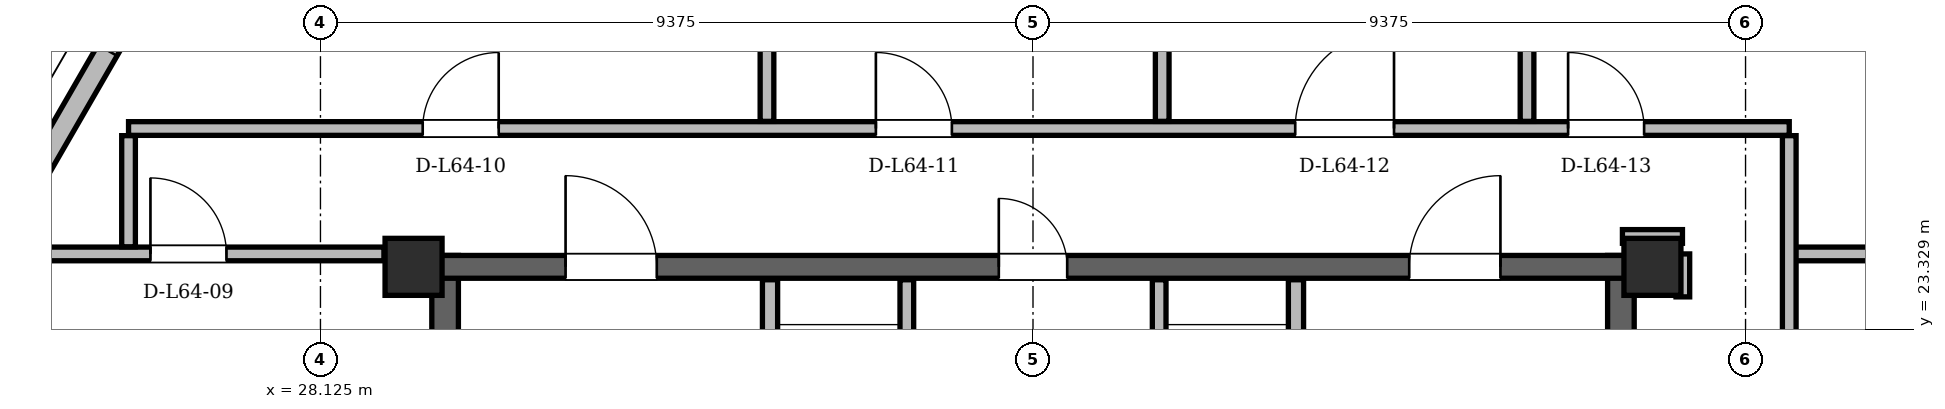
"""IFC4 building model, lengths in metres.
Left out: names, types, materials, properties, quantities, classifications, styles, units other than length and angle.
Written with IfcOpenShell. Run it as: python <this file> out.ifc"""

import sys

from ifc_helpers import new_model, si_unit, direction, frame, frame_2d, origin, origin_2d, place, context, subcontext, project, spatial, rectangle, hollow_rectangle, extrude, element, fill, save


model = new_model("IFC4")
c1 = context("Model", 3, precision=1e-05, world=origin(), true_north=direction((0.0, 1.0)))
c2 = subcontext(c1, "Body", "Model", "MODEL_VIEW")
j1 = project(units=[si_unit("LENGTHUNIT", "METRE"), si_unit("PLANEANGLEUNIT", "RADIAN")], contexts=[c1])
p1 = place(None, origin())
s1 = spatial("IfcSite", under=j1, at=p1, CompositionType="ELEMENT")
p2 = place(p1, origin())
s2 = spatial("IfcBuilding", under=s1, at=p2, CompositionType="ELEMENT")
p3 = place(p2, frame((0.0, 0.0, 241.5)))
s3 = spatial("IfcBuildingStorey", under=s2, at=p3, CompositionType="ELEMENT", Elevation=241.5)
for number, where, z_axis, x_axis in (
    (1, (45.65, 24.15, 0.0), (0.0, 0.0, 1.0), (1.0, 0.0, 0.0)),
    (2, (29.35, 24.15, 0.0), (0.0, 0.0, 1.0), (1.0, 0.0, 0.0)),
):
    element("IfcColumn", number, at=place(p3, frame(where, z_axis=z_axis, x_axis=x_axis)), inside=s3, PredefinedType="COLUMN", context=c2, shape_type="SweptSolid", body=[
        extrude(hollow_rectangle(XDim=0.75, YDim=0.75, WallThickness=0.06, at=origin_2d()), origin(), (0.0, 0.0, 1.0), 3.6),
    ])
for number, where, z_axis, x_axis in (
    (3, (29.765, 11.0, 0.0), (0.0, 0.0, 1.0), (0.0, 1.0, 0.0)),
    (4, (45.235, 11.0, 0.0), (0.0, 0.0, 1.0), (0.0, 1.0, 0.0)),
):
    element("IfcWall", number, at=place(p3, frame(where, z_axis=z_axis, x_axis=x_axis)), inside=s3, PredefinedType="SHEAR", context=c2, shape_type="SweptSolid", body=[
        extrude(rectangle(XDim=13.3, YDim=0.35, at=frame_2d((6.65, 0.0))), origin(), (0.0, 0.0, 1.0), 3.34),
    ])
p4 = place(p3, frame((29.65, 24.15, 0.0), z_axis=(0.0, 0.0, 1.0), x_axis=(1.0, 0.0, 0.0)))
e5 = element("IfcWall", 5, at=p4, inside=s3, PredefinedType="SHEAR", context=c2, shape_type="SweptSolid", body=[
    extrude(rectangle(XDim=15.7, YDim=0.3, at=frame_2d((7.85, 0.0))), origin(), (0.0, 0.0, 1.0), 3.34),
])
p5 = place(p4, frame((1.7, 0.0, 0.0)))
e6 = element("IfcOpeningElement", 6, at=p5, cuts=e5, PredefinedType="OPENING", context=c2, shape_type="SweptSolid", body=[
    extrude(rectangle(XDim=1.2, YDim=2.2, at=frame_2d((0.6, 1.1))), frame((0.0, 0.15, 0.0), z_axis=(0.0, -1.0, 0.0), x_axis=(1.0, 0.0, 0.0)), (0.0, 0.0, 1.0), 0.3),
])
p6 = place(p4, frame((12.8, 0.0, 0.0)))
e7 = element("IfcOpeningElement", 7, at=p6, cuts=e5, PredefinedType="OPENING", context=c2, shape_type="SweptSolid", body=[
    extrude(rectangle(XDim=1.2, YDim=2.2, at=frame_2d((0.6, 1.1))), frame((0.0, 0.15, 0.0), z_axis=(0.0, -1.0, 0.0), x_axis=(1.0, 0.0, 0.0)), (0.0, 0.0, 1.0), 0.3),
])
p7 = place(p4, frame((7.4, 0.0, 0.0)))
e8 = element("IfcOpeningElement", 8, at=p7, cuts=e5, PredefinedType="OPENING", context=c2, shape_type="SweptSolid", body=[
    extrude(rectangle(XDim=0.9, YDim=2.05, at=frame_2d((0.45, 1.025))), frame((0.0, 0.15, 0.0), z_axis=(0.0, -1.0, 0.0), x_axis=(1.0, 0.0, 0.0)), (0.0, 0.0, 1.0), 0.3),
])
p8 = place(p3, frame((58.857, 11.097, 0.0), z_axis=(0.0, 0.0, 1.0), x_axis=(-0.499999075663, 0.86602593745, 0.0)))
e9 = element("IfcWall", 9, at=p8, inside=s3, PredefinedType="SOLIDWALL", context=c2, shape_type="SweptSolid", body=[
    extrude(rectangle(XDim=36.951, YDim=0.29, at=frame_2d((18.476, 0.0))), origin(), (0.0, 0.0, 1.0), 2.637),
])
p9 = place(p8, frame((7.615, 0.0, 0.0)))
e10 = element("IfcOpeningElement", 10, at=p9, cuts=e9, PredefinedType="OPENING", context=c2, shape_type="SweptSolid", body=[
    extrude(rectangle(XDim=1.5, YDim=2.2, at=frame_2d((0.75, 1.1))), frame((0.0, 0.145, 0.0), z_axis=(0.0, -1.0, 0.0), x_axis=(1.0, 0.0, 0.0)), (0.0, 0.0, 1.0), 0.29),
])
p10 = place(p8, frame((28.662, 0.0, 0.0)))
e11 = element("IfcOpeningElement", 11, at=p10, cuts=e9, PredefinedType="OPENING", context=c2, shape_type="SweptSolid", body=[
    extrude(rectangle(XDim=1.5, YDim=2.2, at=frame_2d((0.75, 1.1))), frame((0.0, 0.145, 0.0), z_axis=(0.0, -1.0, 0.0), x_axis=(1.0, 0.0, 0.0)), (0.0, 0.0, 1.0), 0.29),
])
p11 = place(p8, frame((3.768, 0.0, 0.85)))
e12 = element("IfcOpeningElement", 12, at=p11, cuts=e9, PredefinedType="OPENING", context=c2, shape_type="SweptSolid", body=[
    extrude(rectangle(XDim=1.2, YDim=1.48, at=frame_2d((0.6, 0.74))), frame((0.0, 0.145, 0.0), z_axis=(0.0, -1.0, 0.0), x_axis=(1.0, 0.0, 0.0)), (0.0, 0.0, 1.0), 0.29),
])
p12 = place(p8, frame((1.122, 0.0, 0.85)))
e13 = element("IfcOpeningElement", 13, at=p12, cuts=e9, PredefinedType="OPENING", context=c2, shape_type="SweptSolid", body=[
    extrude(rectangle(XDim=1.6, YDim=1.677, at=frame_2d((0.8, 0.838))), frame((0.0, 0.145, 0.0), z_axis=(0.0, -1.0, 0.0), x_axis=(1.0, 0.0, 0.0)), (0.0, 0.0, 1.0), 0.29),
])
p13 = place(p8, frame((34.681, 0.0, 0.85)))
e14 = element("IfcOpeningElement", 14, at=p13, cuts=e9, PredefinedType="OPENING", context=c2, shape_type="SweptSolid", body=[
    extrude(rectangle(XDim=1.2, YDim=1.48, at=frame_2d((0.6, 0.74))), frame((0.0, 0.145, 0.0), z_axis=(0.0, -1.0, 0.0), x_axis=(1.0, 0.0, 0.0)), (0.0, 0.0, 1.0), 0.29),
])
p14 = place(p8, frame((16.81, 0.0, 0.85)))
e15 = element("IfcOpeningElement", 15, at=p14, cuts=e9, PredefinedType="OPENING", context=c2, shape_type="SweptSolid", body=[
    extrude(rectangle(XDim=2.2, YDim=1.677, at=frame_2d((1.1, 0.838))), frame((0.0, 0.145, 0.0), z_axis=(0.0, -1.0, 0.0), x_axis=(1.0, 0.0, 0.0)), (0.0, 0.0, 1.0), 0.29),
])
p15 = place(p8, frame((22.803, 0.0, 0.85)))
e16 = element("IfcOpeningElement", 16, at=p15, cuts=e9, PredefinedType="OPENING", context=c2, shape_type="SweptSolid", body=[
    extrude(rectangle(XDim=1.6, YDim=1.677, at=frame_2d((0.8, 0.838))), frame((0.0, 0.145, 0.0), z_axis=(0.0, -1.0, 0.0), x_axis=(1.0, 0.0, 0.0)), (0.0, 0.0, 1.0), 0.29),
])
p16 = place(p8, frame((9.478, 0.0, 0.85)))
e17 = element("IfcOpeningElement", 17, at=p16, cuts=e9, PredefinedType="OPENING", context=c2, shape_type="SweptSolid", body=[
    extrude(rectangle(XDim=1.2, YDim=1.48, at=frame_2d((0.6, 0.74))), frame((0.0, 0.145, 0.0), z_axis=(0.0, -1.0, 0.0), x_axis=(1.0, 0.0, 0.0)), (0.0, 0.0, 1.0), 0.29),
])
p17 = place(p3, frame((34.618, 43.098, 0.0), z_axis=(0.0, 0.0, 1.0), x_axis=(-0.499999075663, -0.86602593745, 0.0)))
e18 = element("IfcWall", 18, at=p17, inside=s3, PredefinedType="SOLIDWALL", context=c2, shape_type="SweptSolid", body=[
    extrude(rectangle(XDim=36.951, YDim=0.29, at=frame_2d((18.476, 0.0))), origin(), (0.0, 0.0, 1.0), 2.637),
])
p18 = place(p17, frame((8.244, 0.0, 0.0)))
e19 = element("IfcOpeningElement", 19, at=p18, cuts=e18, PredefinedType="OPENING", context=c2, shape_type="SweptSolid", body=[
    extrude(rectangle(XDim=1.5, YDim=2.2, at=frame_2d((0.75, 1.1))), frame((0.0, 0.145, 0.0), z_axis=(0.0, -1.0, 0.0), x_axis=(1.0, 0.0, 0.0)), (0.0, 0.0, 1.0), 0.29),
])
p19 = place(p17, frame((32.022, 0.0, 0.0)))
e20 = element("IfcOpeningElement", 20, at=p19, cuts=e18, PredefinedType="OPENING", context=c2, shape_type="SweptSolid", body=[
    extrude(rectangle(XDim=1.5, YDim=2.2, at=frame_2d((0.75, 1.1))), frame((0.0, 0.145, 0.0), z_axis=(0.0, -1.0, 0.0), x_axis=(1.0, 0.0, 0.0)), (0.0, 0.0, 1.0), 0.29),
])
p20 = place(p17, frame((21.911, 0.0, 0.85)))
e21 = element("IfcOpeningElement", 21, at=p20, cuts=e18, PredefinedType="OPENING", context=c2, shape_type="SweptSolid", body=[
    extrude(rectangle(XDim=2.4, YDim=1.677, at=frame_2d((1.2, 0.838))), frame((0.0, 0.145, 0.0), z_axis=(0.0, -1.0, 0.0), x_axis=(1.0, 0.0, 0.0)), (0.0, 0.0, 1.0), 0.29),
])
p21 = place(p17, frame((28.29, 0.0, 0.85)))
e22 = element("IfcOpeningElement", 22, at=p21, cuts=e18, PredefinedType="OPENING", context=c2, shape_type="SweptSolid", body=[
    extrude(rectangle(XDim=1.2, YDim=1.48, at=frame_2d((0.6, 0.74))), frame((0.0, 0.145, 0.0), z_axis=(0.0, -1.0, 0.0), x_axis=(1.0, 0.0, 0.0)), (0.0, 0.0, 1.0), 0.29),
])
p22 = place(p17, frame((34.755, 0.0, 0.85)))
e23 = element("IfcOpeningElement", 23, at=p22, cuts=e18, PredefinedType="OPENING", context=c2, shape_type="SweptSolid", body=[
    extrude(rectangle(XDim=1.2, YDim=1.48, at=frame_2d((0.6, 0.74))), frame((0.0, 0.145, 0.0), z_axis=(0.0, -1.0, 0.0), x_axis=(1.0, 0.0, 0.0)), (0.0, 0.0, 1.0), 0.29),
])
p23 = place(p17, frame((12.233, 0.0, 0.85)))
e24 = element("IfcOpeningElement", 24, at=p23, cuts=e18, PredefinedType="OPENING", context=c2, shape_type="SweptSolid", body=[
    extrude(rectangle(XDim=1.2, YDim=1.48, at=frame_2d((0.6, 0.74))), frame((0.0, 0.145, 0.0), z_axis=(0.0, -1.0, 0.0), x_axis=(1.0, 0.0, 0.0)), (0.0, 0.0, 1.0), 0.29),
])
p24 = place(p17, frame((16.59, 0.0, 0.85)))
e25 = element("IfcOpeningElement", 25, at=p24, cuts=e18, PredefinedType="OPENING", context=c2, shape_type="SweptSolid", body=[
    extrude(rectangle(XDim=2.0, YDim=1.677, at=frame_2d((1.0, 0.838))), frame((0.0, 0.145, 0.0), z_axis=(0.0, -1.0, 0.0), x_axis=(1.0, 0.0, 0.0)), (0.0, 0.0, 1.0), 0.29),
])
p25 = place(p17, frame((3.092, 0.0, 0.85)))
e26 = element("IfcOpeningElement", 26, at=p25, cuts=e18, PredefinedType="OPENING", context=c2, shape_type="SweptSolid", body=[
    extrude(rectangle(XDim=1.2, YDim=1.48, at=frame_2d((0.6, 0.74))), frame((0.0, 0.145, 0.0), z_axis=(0.0, -1.0, 0.0), x_axis=(1.0, 0.0, 0.0)), (0.0, 0.0, 1.0), 0.29),
])
p26 = place(p3, frame((34.04, 19.48, 0.0), z_axis=(0.0, 0.0, 1.0), x_axis=(0.0, 1.0, 0.0)))
e27 = element("IfcWall", 27, at=p26, inside=s3, PredefinedType="PARTITIONING", context=c2, shape_type="SweptSolid", body=[
    extrude(rectangle(XDim=4.5, YDim=0.2, at=frame_2d((2.25, 0.0))), origin(), (0.0, 0.0, 1.0), 3.34),
])
p27 = place(p26, frame((2.12, 0.0, 0.0)))
e28 = element("IfcOpeningElement", 28, at=p27, cuts=e27, PredefinedType="OPENING", context=c2, shape_type="SweptSolid", body=[
    extrude(rectangle(XDim=1.1, YDim=2.2, at=frame_2d((0.55, 1.1))), frame((0.0, 0.1, 0.0), z_axis=(0.0, -1.0, 0.0), x_axis=(1.0, 0.0, 0.0)), (0.0, 0.0, 1.0), 0.2),
])
p28 = place(p3, frame((35.84, 20.96, 0.0), z_axis=(0.0, 0.0, 1.0), x_axis=(0.0, 1.0, 0.0)))
e29 = element("IfcWall", 29, at=p28, inside=s3, PredefinedType="PARTITIONING", context=c2, shape_type="SweptSolid", body=[
    extrude(rectangle(XDim=3.02, YDim=0.18, at=frame_2d((1.51, 0.0))), origin(), (0.0, 0.0, 1.0), 3.34),
])
p29 = place(p3, frame((40.96, 19.48, 0.0), z_axis=(0.0, 0.0, 1.0), x_axis=(0.0, 1.0, 0.0)))
e30 = element("IfcWall", 30, at=p29, inside=s3, PredefinedType="PARTITIONING", context=c2, shape_type="SweptSolid", body=[
    extrude(rectangle(XDim=4.5, YDim=0.2, at=frame_2d((2.25, 0.0))), origin(), (0.0, 0.0, 1.0), 3.34),
])
p30 = place(p29, frame((2.12, 0.0, 0.0)))
e31 = element("IfcOpeningElement", 31, at=p30, cuts=e30, PredefinedType="OPENING", context=c2, shape_type="SweptSolid", body=[
    extrude(rectangle(XDim=1.1, YDim=2.2, at=frame_2d((0.55, 1.1))), frame((0.0, 0.1, 0.0), z_axis=(0.0, -1.0, 0.0), x_axis=(1.0, 0.0, 0.0)), (0.0, 0.0, 1.0), 0.2),
])
p31 = place(p3, frame((39.16, 20.96, 0.0), z_axis=(0.0, 0.0, 1.0), x_axis=(0.0, 1.0, 0.0)))
e32 = element("IfcWall", 32, at=p31, inside=s3, PredefinedType="PARTITIONING", context=c2, shape_type="SweptSolid", body=[
    extrude(rectangle(XDim=3.02, YDim=0.18, at=frame_2d((1.51, 0.0))), origin(), (0.0, 0.0, 1.0), 3.34),
])
p32 = place(p3, frame((23.949, 24.32, 0.0), z_axis=(0.0, 0.0, 1.0), x_axis=(1.0, 0.0, 0.0)))
e33 = element("IfcWall", 33, at=p32, inside=s3, PredefinedType="PARTITIONING", context=c2, shape_type="SweptSolid", body=[
    extrude(rectangle(XDim=5.011, YDim=0.18, at=frame_2d((2.505, 0.0))), origin(), (0.0, 0.0, 1.0), 3.34),
])
p33 = place(p32, frame((1.939, 0.0, 0.0)))
e34 = element("IfcOpeningElement", 34, at=p33, cuts=e33, PredefinedType="OPENING", context=c2, shape_type="SweptSolid", body=[
    extrude(rectangle(XDim=1.0, YDim=2.18, at=frame_2d((0.5, 1.09))), frame((0.0, 0.09, 0.0), z_axis=(0.0, -1.0, 0.0), x_axis=(1.0, 0.0, 0.0)), (0.0, 0.0, 1.0), 0.18),
])
p34 = place(p3, frame((47.45, 24.32, 0.0), z_axis=(0.0, 0.0, 1.0), x_axis=(1.0, 0.0, 0.0)))
e35 = element("IfcWall", 35, at=p34, inside=s3, PredefinedType="PARTITIONING", context=c2, shape_type="SweptSolid", body=[
    extrude(rectangle(XDim=3.601, YDim=0.18, at=frame_2d((1.801, 0.0))), origin(), (0.0, 0.0, 1.0), 3.34),
])
p35 = place(p3, frame((45.255, 24.55, 0.0), z_axis=(0.0, 0.0, 1.0), x_axis=(1.0, 0.0, 0.0)))
e36 = element("IfcWall", 36, at=p35, inside=s3, PredefinedType="PARTITIONING", context=c2, shape_type="SweptSolid", body=[
    extrude(rectangle(XDim=0.79, YDim=0.18, at=frame_2d((0.395, 0.0))), origin(), (0.0, 0.0, 1.0), 2.873),
])
p36 = place(p3, frame((25.6, 25.97, 0.0), z_axis=(0.0, 0.0, 1.0), x_axis=(1.0, 0.0, 0.0)))
e37 = element("IfcWall", 37, at=p36, inside=s3, PredefinedType="PARTITIONING", context=c2, shape_type="SweptSolid", body=[
    extrude(rectangle(XDim=21.85, YDim=0.18, at=frame_2d((10.925, 0.0))), origin(), (0.0, 0.0, 1.0), 2.873),
])
p37 = place(p36, frame((3.87, 0.0, 0.0)))
e38 = element("IfcOpeningElement", 38, at=p37, cuts=e37, PredefinedType="OPENING", context=c2, shape_type="SweptSolid", body=[
    extrude(rectangle(XDim=1.0, YDim=2.18, at=frame_2d((0.5, 1.09))), frame((0.0, 0.09, 0.0), z_axis=(0.0, -1.0, 0.0), x_axis=(1.0, 0.0, 0.0)), (0.0, 0.0, 1.0), 0.18),
])
p38 = place(p36, frame((9.833, 0.0, 0.0)))
e39 = element("IfcOpeningElement", 39, at=p38, cuts=e37, PredefinedType="OPENING", context=c2, shape_type="SweptSolid", body=[
    extrude(rectangle(XDim=1.0, YDim=2.18, at=frame_2d((0.5, 1.09))), frame((0.0, 0.09, 0.0), z_axis=(0.0, -1.0, 0.0), x_axis=(1.0, 0.0, 0.0)), (0.0, 0.0, 1.0), 0.18),
])
p39 = place(p36, frame((15.35, 0.0, 0.0)))
e40 = element("IfcOpeningElement", 40, at=p39, cuts=e37, PredefinedType="OPENING", context=c2, shape_type="SweptSolid", body=[
    extrude(rectangle(XDim=1.3, YDim=2.2, at=frame_2d((0.65, 1.1))), frame((0.0, 0.09, 0.0), z_axis=(0.0, -1.0, 0.0), x_axis=(1.0, 0.0, 0.0)), (0.0, 0.0, 1.0), 0.18),
])
p40 = place(p36, frame((18.94, 0.0, 0.0)))
e41 = element("IfcOpeningElement", 41, at=p40, cuts=e37, PredefinedType="OPENING", context=c2, shape_type="SweptSolid", body=[
    extrude(rectangle(XDim=1.0, YDim=2.18, at=frame_2d((0.5, 1.09))), frame((0.0, 0.09, 0.0), z_axis=(0.0, -1.0, 0.0), x_axis=(1.0, 0.0, 0.0)), (0.0, 0.0, 1.0), 0.18),
])
p41 = place(p3, frame((25.6, 24.414, 0.0), z_axis=(0.0, 0.0, 1.0), x_axis=(0.0, 1.0, 0.0)))
e42 = element("IfcWall", 42, at=p41, inside=s3, PredefinedType="PARTITIONING", context=c2, shape_type="SweptSolid", body=[
    extrude(rectangle(XDim=1.462, YDim=0.18, at=frame_2d((0.731, 0.0))), origin(), (0.0, 0.0, 1.0), 3.34),
])
p42 = place(p3, frame((34.0, 26.064, 0.0), z_axis=(0.0, 0.0, 1.0), x_axis=(0.0, 1.0, 0.0)))
e43 = element("IfcWall", 43, at=p42, inside=s3, PredefinedType="PARTITIONING", context=c2, shape_type="SweptSolid", body=[
    extrude(rectangle(XDim=15.665, YDim=0.18, at=frame_2d((7.833, 0.0))), origin(), (0.0, 0.0, 1.0), 2.873),
])
p43 = place(p3, frame((39.2, 26.064, 0.0), z_axis=(0.0, 0.0, 1.0), x_axis=(0.0, 1.0, 0.0)))
e44 = element("IfcWall", 44, at=p43, inside=s3, PredefinedType="PARTITIONING", context=c2, shape_type="SweptSolid", body=[
    extrude(rectangle(XDim=4.312, YDim=0.18, at=frame_2d((2.156, 0.0))), origin(), (0.0, 0.0, 1.0), 3.34),
])
p44 = place(p3, frame((44.0, 26.064, 0.0), z_axis=(0.0, 0.0, 1.0), x_axis=(0.0, 1.0, 0.0)))
e45 = element("IfcWall", 45, at=p44, inside=s3, PredefinedType="PARTITIONING", context=c2, shape_type="SweptSolid", body=[
    extrude(rectangle(XDim=4.312, YDim=0.18, at=frame_2d((2.156, 0.0))), origin(), (0.0, 0.0, 1.0), 2.873),
])
p45 = place(p3, frame((46.05, 23.755, 0.0), z_axis=(0.0, 0.0, 1.0), x_axis=(0.0, 1.0, 0.0)))
e46 = element("IfcWall", 46, at=p45, inside=s3, PredefinedType="PARTITIONING", context=c2, shape_type="SweptSolid", body=[
    extrude(rectangle(XDim=0.565, YDim=0.18, at=frame_2d((0.283, 0.0))), origin(), (0.0, 0.0, 1.0), 3.34),
])
p46 = place(p3, frame((47.45, 9.394, 0.0), z_axis=(0.0, 0.0, 1.0), x_axis=(0.0, 1.0, 0.0)))
e47 = element("IfcWall", 47, at=p46, inside=s3, PredefinedType="PARTITIONING", context=c2, shape_type="SweptSolid", body=[
    extrude(rectangle(XDim=16.482, YDim=0.18, at=frame_2d((8.241, 0.0))), origin(), (0.0, 0.0, 1.0), 2.873),
])
p47 = place(p46, frame((6.247, 0.0, 0.0)))
e48 = element("IfcOpeningElement", 48, at=p47, cuts=e47, PredefinedType="OPENING", context=c2, shape_type="SweptSolid", body=[
    extrude(rectangle(XDim=1.0, YDim=2.18, at=frame_2d((0.5, 1.09))), frame((0.0, 0.09, 0.0), z_axis=(0.0, -1.0, 0.0), x_axis=(1.0, 0.0, 0.0)), (0.0, 0.0, 1.0), 0.18),
])
p48 = place(p46, frame((10.379, 0.0, 0.0)))
e49 = element("IfcOpeningElement", 49, at=p48, cuts=e47, PredefinedType="OPENING", context=c2, shape_type="SweptSolid", body=[
    extrude(rectangle(XDim=1.0, YDim=2.18, at=frame_2d((0.5, 1.09))), frame((0.0, 0.09, 0.0), z_axis=(0.0, -1.0, 0.0), x_axis=(1.0, 0.0, 0.0)), (0.0, 0.0, 1.0), 0.18),
])
p49 = place(p5, origin())
e50 = element("IfcDoor", 50, at=p49, inside=s3, OperationType="SINGLE_SWING_LEFT", PredefinedType="DOOR", context=c2, shape_type="SweptSolid", body=[
    extrude(rectangle(XDim=1.2, YDim=2.2, at=frame_2d((0.6, 1.1))), frame((0.0, 0.025, 0.0), z_axis=(0.0, -1.0, 0.0), x_axis=(1.0, 0.0, 0.0)), (0.0, 0.0, 1.0), 0.05),
])
fill(e6, e50)
p50 = place(p6, origin())
e51 = element("IfcDoor", 51, at=p50, inside=s3, OperationType="SINGLE_SWING_RIGHT", PredefinedType="DOOR", context=c2, shape_type="SweptSolid", body=[
    extrude(rectangle(XDim=1.2, YDim=2.2, at=frame_2d((0.6, 1.1))), frame((0.0, 0.025, 0.0), z_axis=(0.0, -1.0, 0.0), x_axis=(1.0, 0.0, 0.0)), (0.0, 0.0, 1.0), 0.05),
])
fill(e7, e51)
p51 = place(p7, origin())
e52 = element("IfcDoor", 52, at=p51, inside=s3, OperationType="SINGLE_SWING_LEFT", PredefinedType="DOOR", context=c2, shape_type="SweptSolid", body=[
    extrude(rectangle(XDim=0.9, YDim=2.05, at=frame_2d((0.45, 1.025))), frame((0.0, 0.025, 0.0), z_axis=(0.0, -1.0, 0.0), x_axis=(1.0, 0.0, 0.0)), (0.0, 0.0, 1.0), 0.05),
])
fill(e8, e52)
p52 = place(p33, origin())
e53 = element("IfcDoor", 53, at=p52, inside=s3, OperationType="SINGLE_SWING_LEFT", PredefinedType="DOOR", context=c2, shape_type="SweptSolid", body=[
    extrude(rectangle(XDim=1.0, YDim=2.18, at=frame_2d((0.5, 1.09))), frame((0.0, 0.025, 0.0), z_axis=(0.0, -1.0, 0.0), x_axis=(1.0, 0.0, 0.0)), (0.0, 0.0, 1.0), 0.05),
])
fill(e34, e53)
p53 = place(p37, origin())
e54 = element("IfcDoor", 54, at=p53, inside=s3, OperationType="SINGLE_SWING_RIGHT", PredefinedType="DOOR", context=c2, shape_type="SweptSolid", body=[
    extrude(rectangle(XDim=1.0, YDim=2.18, at=frame_2d((0.5, 1.09))), frame((0.0, 0.025, 0.0), z_axis=(0.0, -1.0, 0.0), x_axis=(1.0, 0.0, 0.0)), (0.0, 0.0, 1.0), 0.05),
])
fill(e38, e54)
p54 = place(p38, origin())
e55 = element("IfcDoor", 55, at=p54, inside=s3, OperationType="SINGLE_SWING_LEFT", PredefinedType="DOOR", context=c2, shape_type="SweptSolid", body=[
    extrude(rectangle(XDim=1.0, YDim=2.18, at=frame_2d((0.5, 1.09))), frame((0.0, 0.025, 0.0), z_axis=(0.0, -1.0, 0.0), x_axis=(1.0, 0.0, 0.0)), (0.0, 0.0, 1.0), 0.05),
])
fill(e39, e55)
p55 = place(p39, origin())
e56 = element("IfcDoor", 56, at=p55, inside=s3, OperationType="SINGLE_SWING_RIGHT", PredefinedType="DOOR", context=c2, shape_type="SweptSolid", body=[
    extrude(rectangle(XDim=1.3, YDim=2.2, at=frame_2d((0.65, 1.1))), frame((0.0, 0.025, 0.0), z_axis=(0.0, -1.0, 0.0), x_axis=(1.0, 0.0, 0.0)), (0.0, 0.0, 1.0), 0.05),
])
fill(e40, e56)
p56 = place(p40, origin())
e57 = element("IfcDoor", 57, at=p56, inside=s3, OperationType="SINGLE_SWING_LEFT", PredefinedType="DOOR", context=c2, shape_type="SweptSolid", body=[
    extrude(rectangle(XDim=1.0, YDim=2.18, at=frame_2d((0.5, 1.09))), frame((0.0, 0.025, 0.0), z_axis=(0.0, -1.0, 0.0), x_axis=(1.0, 0.0, 0.0)), (0.0, 0.0, 1.0), 0.05),
])
fill(e41, e57)
save(model, sys.argv[1])
